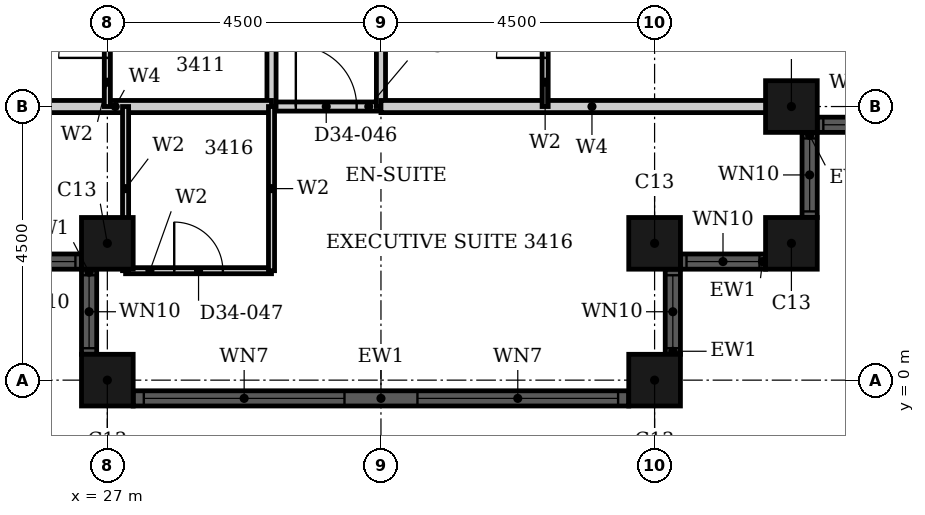
"""IFC4 building model, lengths in metres.
Left out: names, types, materials, properties, quantities, classifications, styles, units other than length and angle.
Written with IfcOpenShell. Run it as: python <this file> out.ifc"""

import sys

from ifc_helpers import new_model, si_unit, direction, frame, frame_2d, origin, origin_2d, place, context, subcontext, project, spatial, rectangle, hollow_rectangle, extrude, element, fill, save


model = new_model("IFC4")
c1 = context("Model", 3, precision=1e-05, world=origin(), true_north=direction((0.0, 1.0)))
c2 = subcontext(c1, "Body", "Model", "MODEL_VIEW")
j1 = project(units=[si_unit("LENGTHUNIT", "METRE"), si_unit("PLANEANGLEUNIT", "RADIAN")], contexts=[c1])
p1 = place(None, origin())
s1 = spatial("IfcSite", under=j1, at=p1, CompositionType="ELEMENT")
p2 = place(p1, origin())
s2 = spatial("IfcBuilding", under=s1, at=p2, CompositionType="ELEMENT")
p3 = place(p2, frame((0.0, 0.0, 136.8)))
s3 = spatial("IfcBuildingStorey", under=s2, at=p3, CompositionType="ELEMENT", Elevation=136.8)
for number, where, z_axis, x_axis in (
    (1, (27.0, 2.25, 0.0), (0.0, 0.0, 1.0), (1.0, 0.0, 0.0)),
    (2, (27.0, 0.0, 0.0), (0.0, 0.0, 1.0), (1.0, 0.0, 0.0)),
    (3, (36.0, 0.0, 0.0), (0.0, 0.0, 1.0), (1.0, 0.0, 0.0)),
    (4, (36.0, 2.25, 0.0), (0.0, 0.0, 1.0), (1.0, 0.0, 0.0)),
    (5, (38.25, 2.25, 0.0), (0.0, 0.0, 1.0), (1.0, 0.0, 0.0)),
    (6, (38.25, 4.5, 0.0), (0.0, 0.0, 1.0), (1.0, 0.0, 0.0)),
):
    element("IfcColumn", number, at=place(p3, frame(where, z_axis=z_axis, x_axis=x_axis)), inside=s3, PredefinedType="COLUMN", context=c2, shape_type="SweptSolid", body=[
        extrude(hollow_rectangle(XDim=0.85, YDim=0.85, WallThickness=0.026, at=origin_2d()), origin(), (0.0, 0.0, 1.0), 3.6),
    ])
p4 = place(p3, frame((25.175, 1.95, 0.0), z_axis=(0.0, 0.0, 1.0), x_axis=(1.0, 0.0, 0.0)))
e7 = element("IfcWall", 7, at=p4, inside=s3, PredefinedType="SOLIDWALL", context=c2, shape_type="SweptSolid", body=[
    extrude(rectangle(XDim=1.4, YDim=0.25, at=frame_2d((0.7, 0.0))), origin(), (0.0, 0.0, 1.0), 3.6),
])
p5 = place(p4, frame((0.1, 0.0, 0.9)))
e8 = element("IfcOpeningElement", 8, at=p5, cuts=e7, PredefinedType="OPENING", context=c2, shape_type="SweptSolid", body=[
    extrude(rectangle(XDim=1.2, YDim=1.85, at=frame_2d((0.6, 0.925))), frame((0.0, 0.135, 0.0), z_axis=(0.0, -1.0, 0.0), x_axis=(1.0, 0.0, 0.0)), (0.0, 0.0, 1.0), 0.27),
])
p6 = place(p3, frame((26.7, 1.825, 0.0), z_axis=(0.0, 0.0, 1.0), x_axis=(0.0, -1.0, 0.0)))
e9 = element("IfcWall", 9, at=p6, inside=s3, PredefinedType="SOLIDWALL", context=c2, shape_type="SweptSolid", body=[
    extrude(rectangle(XDim=1.4, YDim=0.25, at=frame_2d((0.7, 0.0))), origin(), (0.0, 0.0, 1.0), 3.6),
])
p7 = place(p6, frame((0.1, 0.0, 0.9)))
e10 = element("IfcOpeningElement", 10, at=p7, cuts=e9, PredefinedType="OPENING", context=c2, shape_type="SweptSolid", body=[
    extrude(rectangle(XDim=1.2, YDim=1.85, at=frame_2d((0.6, 0.925))), frame((0.0, 0.135, 0.0), z_axis=(0.0, -1.0, 0.0), x_axis=(1.0, 0.0, 0.0)), (0.0, 0.0, 1.0), 0.27),
])
p8 = place(p3, frame((27.425, -0.3, 0.0), z_axis=(0.0, 0.0, 1.0), x_axis=(1.0, 0.0, 0.0)))
e11 = element("IfcWall", 11, at=p8, inside=s3, PredefinedType="SOLIDWALL", context=c2, shape_type="SweptSolid", body=[
    extrude(rectangle(XDim=8.15, YDim=0.25, at=frame_2d((4.075, 0.0))), origin(), (0.0, 0.0, 1.0), 3.6),
])
p9 = place(p8, frame((0.175, 0.0, 0.9)))
e12 = element("IfcOpeningElement", 12, at=p9, cuts=e11, PredefinedType="OPENING", context=c2, shape_type="SweptSolid", body=[
    extrude(rectangle(XDim=3.3, YDim=1.85, at=frame_2d((1.65, 0.925))), frame((0.0, 0.135, 0.0), z_axis=(0.0, -1.0, 0.0), x_axis=(1.0, 0.0, 0.0)), (0.0, 0.0, 1.0), 0.27),
])
p10 = place(p8, frame((4.675, 0.0, 0.9)))
e13 = element("IfcOpeningElement", 13, at=p10, cuts=e11, PredefinedType="OPENING", context=c2, shape_type="SweptSolid", body=[
    extrude(rectangle(XDim=3.3, YDim=1.85, at=frame_2d((1.65, 0.925))), frame((0.0, 0.135, 0.0), z_axis=(0.0, -1.0, 0.0), x_axis=(1.0, 0.0, 0.0)), (0.0, 0.0, 1.0), 0.27),
])
p11 = place(p3, frame((36.3, 0.425, 0.0), z_axis=(0.0, 0.0, 1.0), x_axis=(0.0, 1.0, 0.0)))
e14 = element("IfcWall", 14, at=p11, inside=s3, PredefinedType="SOLIDWALL", context=c2, shape_type="SweptSolid", body=[
    extrude(rectangle(XDim=1.4, YDim=0.25, at=frame_2d((0.7, 0.0))), origin(), (0.0, 0.0, 1.0), 3.6),
])
p12 = place(p11, frame((0.1, 0.0, 0.9)))
e15 = element("IfcOpeningElement", 15, at=p12, cuts=e14, PredefinedType="OPENING", context=c2, shape_type="SweptSolid", body=[
    extrude(rectangle(XDim=1.2, YDim=1.85, at=frame_2d((0.6, 0.925))), frame((0.0, 0.135, 0.0), z_axis=(0.0, -1.0, 0.0), x_axis=(1.0, 0.0, 0.0)), (0.0, 0.0, 1.0), 0.27),
])
p13 = place(p3, frame((36.425, 1.95, 0.0), z_axis=(0.0, 0.0, 1.0), x_axis=(1.0, 0.0, 0.0)))
e16 = element("IfcWall", 16, at=p13, inside=s3, PredefinedType="SOLIDWALL", context=c2, shape_type="SweptSolid", body=[
    extrude(rectangle(XDim=1.4, YDim=0.25, at=frame_2d((0.7, 0.0))), origin(), (0.0, 0.0, 1.0), 3.6),
])
p14 = place(p13, frame((0.1, 0.0, 0.9)))
e17 = element("IfcOpeningElement", 17, at=p14, cuts=e16, PredefinedType="OPENING", context=c2, shape_type="SweptSolid", body=[
    extrude(rectangle(XDim=1.2, YDim=1.85, at=frame_2d((0.6, 0.925))), frame((0.0, 0.135, 0.0), z_axis=(0.0, -1.0, 0.0), x_axis=(1.0, 0.0, 0.0)), (0.0, 0.0, 1.0), 0.27),
])
p15 = place(p3, frame((38.55, 2.675, 0.0), z_axis=(0.0, 0.0, 1.0), x_axis=(0.0, 1.0, 0.0)))
e18 = element("IfcWall", 18, at=p15, inside=s3, PredefinedType="SOLIDWALL", context=c2, shape_type="SweptSolid", body=[
    extrude(rectangle(XDim=1.4, YDim=0.25, at=frame_2d((0.7, 0.0))), origin(), (0.0, 0.0, 1.0), 3.6),
])
p16 = place(p15, frame((0.1, 0.0, 0.9)))
e19 = element("IfcOpeningElement", 19, at=p16, cuts=e18, PredefinedType="OPENING", context=c2, shape_type="SweptSolid", body=[
    extrude(rectangle(XDim=1.2, YDim=1.85, at=frame_2d((0.6, 0.925))), frame((0.0, 0.135, 0.0), z_axis=(0.0, -1.0, 0.0), x_axis=(1.0, 0.0, 0.0)), (0.0, 0.0, 1.0), 0.27),
])
p17 = place(p3, frame((38.675, 4.2, 0.0), z_axis=(0.0, 0.0, 1.0), x_axis=(1.0, 0.0, 0.0)))
e20 = element("IfcWall", 20, at=p17, inside=s3, PredefinedType="SOLIDWALL", context=c2, shape_type="SweptSolid", body=[
    extrude(rectangle(XDim=1.4, YDim=0.25, at=frame_2d((0.7, 0.0))), origin(), (0.0, 0.0, 1.0), 3.6),
])
p18 = place(p17, frame((0.1, 0.0, 0.9)))
e21 = element("IfcOpeningElement", 21, at=p18, cuts=e20, PredefinedType="OPENING", context=c2, shape_type="SweptSolid", body=[
    extrude(rectangle(XDim=1.2, YDim=1.85, at=frame_2d((0.6, 0.925))), frame((0.0, 0.135, 0.0), z_axis=(0.0, -1.0, 0.0), x_axis=(1.0, 0.0, 0.0)), (0.0, 0.0, 1.0), 0.27),
])
p19 = place(p3, frame((29.7, 4.5, 0.0), z_axis=(0.0, 0.0, 1.0), x_axis=(1.0, 0.0, 0.0)))
e22 = element("IfcWall", 22, at=p19, inside=s3, PredefinedType="PARTITIONING", context=c2, shape_type="SweptSolid", body=[
    extrude(rectangle(XDim=1.8, YDim=0.15, at=frame_2d((0.9, 0.0))), origin(), (0.0, 0.0, 1.0), 3.2),
])
p20 = place(p19, frame((0.4, 0.0, 0.0)))
e23 = element("IfcOpeningElement", 23, at=p20, cuts=e22, PredefinedType="OPENING", context=c2, shape_type="SweptSolid", body=[
    extrude(rectangle(XDim=1.0, YDim=2.1, at=frame_2d((0.5, 1.05))), frame((0.0, 0.085, 0.0), z_axis=(0.0, -1.0, 0.0), x_axis=(1.0, 0.0, 0.0)), (0.0, 0.0, 1.0), 0.17),
])
p21 = place(p3, frame((29.7, 4.5, 0.0), z_axis=(0.0, 0.0, 1.0), x_axis=(0.0, 1.0, 0.0)))
e24 = element("IfcWall", 24, at=p21, inside=s3, PredefinedType="PARTITIONING", context=c2, shape_type="SweptSolid", body=[
    extrude(rectangle(XDim=16.2, YDim=0.15, at=frame_2d((8.1, 0.0))), origin(), (0.0, 0.0, 1.0), 3.2),
])
p22 = place(p21, frame((7.45, 0.0, 0.0)))
e25 = element("IfcOpeningElement", 25, at=p22, cuts=e24, PredefinedType="OPENING", context=c2, shape_type="SweptSolid", body=[
    extrude(rectangle(XDim=1.0, YDim=2.1, at=frame_2d((0.5, 1.05))), frame((0.0, 0.085, 0.0), z_axis=(0.0, -1.0, 0.0), x_axis=(1.0, 0.0, 0.0)), (0.0, 0.0, 1.0), 0.17),
])
p23 = place(p21, frame((2.95, 0.0, 0.0)))
e26 = element("IfcOpeningElement", 26, at=p23, cuts=e24, PredefinedType="OPENING", context=c2, shape_type="SweptSolid", body=[
    extrude(rectangle(XDim=1.0, YDim=2.1, at=frame_2d((0.5, 1.05))), frame((0.0, 0.085, 0.0), z_axis=(0.0, -1.0, 0.0), x_axis=(1.0, 0.0, 0.0)), (0.0, 0.0, 1.0), 0.17),
])
p24 = place(p3, frame((31.5, 4.5, 0.0), z_axis=(0.0, 0.0, 1.0), x_axis=(0.0, 1.0, 0.0)))
e27 = element("IfcWall", 27, at=p24, inside=s3, PredefinedType="PARTITIONING", context=c2, shape_type="SweptSolid", body=[
    extrude(rectangle(XDim=16.2, YDim=0.15, at=frame_2d((8.1, 0.0))), origin(), (0.0, 0.0, 1.0), 2.48),
])
p25 = place(p24, frame((6.25, 0.0, 0.0)))
e28 = element("IfcOpeningElement", 28, at=p25, cuts=e27, PredefinedType="OPENING", context=c2, shape_type="SweptSolid", body=[
    extrude(rectangle(XDim=1.0, YDim=2.1, at=frame_2d((0.5, 1.05))), frame((0.0, 0.085, 0.0), z_axis=(0.0, -1.0, 0.0), x_axis=(1.0, 0.0, 0.0)), (0.0, 0.0, 1.0), 0.17),
])
p26 = place(p3, frame((24.56, 4.5, 0.0), z_axis=(0.0, 0.0, 1.0), x_axis=(1.0, 0.0, 0.0)))
e29 = element("IfcWall", 29, at=p26, inside=s3, PredefinedType="PARTITIONING", context=c2, shape_type="SweptSolid", body=[
    extrude(rectangle(XDim=5.14, YDim=0.2, at=frame_2d((2.57, 0.0))), origin(), (0.0, 0.0, 1.0), 3.2),
])
p27 = place(p3, frame((31.5, 4.5, 0.0), z_axis=(0.0, 0.0, 1.0), x_axis=(1.0, 0.0, 0.0)))
e30 = element("IfcWall", 30, at=p27, inside=s3, PredefinedType="PARTITIONING", context=c2, shape_type="SweptSolid", body=[
    extrude(rectangle(XDim=6.94, YDim=0.2, at=frame_2d((3.47, 0.0))), origin(), (0.0, 0.0, 1.0), 3.2),
])
p28 = place(p3, frame((27.3, 1.8, 0.0), z_axis=(0.0, 0.0, 1.0), x_axis=(1.0, 0.0, 0.0)))
e31 = element("IfcWall", 31, at=p28, inside=s3, PredefinedType="PARTITIONING", context=c2, shape_type="SweptSolid", body=[
    extrude(rectangle(XDim=2.4, YDim=0.1, at=frame_2d((1.2, 0.0))), origin(), (0.0, 0.0, 1.0), 3.2),
])
p29 = place(p28, frame((0.8, 0.0, 0.0)))
e32 = element("IfcOpeningElement", 32, at=p29, cuts=e31, PredefinedType="OPENING", context=c2, shape_type="SweptSolid", body=[
    extrude(rectangle(XDim=0.8, YDim=2.1, at=frame_2d((0.4, 1.05))), frame((0.0, 0.06, 0.0), z_axis=(0.0, -1.0, 0.0), x_axis=(1.0, 0.0, 0.0)), (0.0, 0.0, 1.0), 0.12),
])
p30 = place(p3, frame((27.0, 4.5, 0.0), z_axis=(0.0, 0.0, 1.0), x_axis=(0.0, 1.0, 0.0)))
e33 = element("IfcWall", 33, at=p30, inside=s3, PredefinedType="PARTITIONING", context=c2, shape_type="SweptSolid", body=[
    extrude(rectangle(XDim=2.4, YDim=0.1, at=frame_2d((1.2, 0.0))), origin(), (0.0, 0.0, 1.0), 2.48),
])
p31 = place(p30, frame((0.8, 0.0, 0.0)))
e34 = element("IfcOpeningElement", 34, at=p31, cuts=e33, PredefinedType="OPENING", context=c2, shape_type="SweptSolid", body=[
    extrude(rectangle(XDim=0.8, YDim=2.1, at=frame_2d((0.4, 1.05))), frame((0.0, 0.06, 0.0), z_axis=(0.0, -1.0, 0.0), x_axis=(1.0, 0.0, 0.0)), (0.0, 0.0, 1.0), 0.12),
])
for number, where, z_axis, x_axis in (
    (35, (27.3, 1.8, 0.0), (0.0, 0.0, 1.0), (0.0, 1.0, 0.0)),
    (36, (29.7, 1.8, 0.0), (0.0, 0.0, 1.0), (0.0, 1.0, 0.0)),
):
    element("IfcWall", number, at=place(p3, frame(where, z_axis=z_axis, x_axis=x_axis)), inside=s3, PredefinedType="PARTITIONING", context=c2, shape_type="SweptSolid", body=[
        extrude(rectangle(XDim=2.7, YDim=0.1, at=frame_2d((1.35, 0.0))), origin(), (0.0, 0.0, 1.0), 3.2),
    ])
p32 = place(p3, frame((34.2, 4.5, 0.0), z_axis=(0.0, 0.0, 1.0), x_axis=(0.0, 1.0, 0.0)))
e37 = element("IfcWall", 37, at=p32, inside=s3, PredefinedType="PARTITIONING", context=c2, shape_type="SweptSolid", body=[
    extrude(rectangle(XDim=2.4, YDim=0.1, at=frame_2d((1.2, 0.0))), origin(), (0.0, 0.0, 1.0), 3.2),
])
p33 = place(p32, frame((0.8, 0.0, 0.0)))
e38 = element("IfcOpeningElement", 38, at=p33, cuts=e37, PredefinedType="OPENING", context=c2, shape_type="SweptSolid", body=[
    extrude(rectangle(XDim=0.8, YDim=2.1, at=frame_2d((0.4, 1.05))), frame((0.0, 0.06, 0.0), z_axis=(0.0, -1.0, 0.0), x_axis=(1.0, 0.0, 0.0)), (0.0, 0.0, 1.0), 0.12),
])
p34 = place(p5, origin())
e39 = element("IfcWindow", 39, at=p34, inside=s3, PartitioningType="SINGLE_PANEL", PredefinedType="WINDOW", context=c2, shape_type="SweptSolid", body=[
    extrude(rectangle(XDim=1.2, YDim=1.85, at=frame_2d((0.6, 0.925))), frame((0.0, 0.03, 0.0), z_axis=(0.0, -1.0, 0.0), x_axis=(1.0, 0.0, 0.0)), (0.0, 0.0, 1.0), 0.06),
])
fill(e8, e39)
p35 = place(p7, origin())
e40 = element("IfcWindow", 40, at=p35, inside=s3, PartitioningType="SINGLE_PANEL", PredefinedType="WINDOW", context=c2, shape_type="SweptSolid", body=[
    extrude(rectangle(XDim=1.2, YDim=1.85, at=frame_2d((0.6, 0.925))), frame((0.0, 0.03, 0.0), z_axis=(0.0, -1.0, 0.0), x_axis=(1.0, 0.0, 0.0)), (0.0, 0.0, 1.0), 0.06),
])
fill(e10, e40)
p36 = place(p9, origin())
e41 = element("IfcWindow", 41, at=p36, inside=s3, PartitioningType="SINGLE_PANEL", PredefinedType="WINDOW", context=c2, shape_type="SweptSolid", body=[
    extrude(rectangle(XDim=3.3, YDim=1.85, at=frame_2d((1.65, 0.925))), frame((0.0, 0.03, 0.0), z_axis=(0.0, -1.0, 0.0), x_axis=(1.0, 0.0, 0.0)), (0.0, 0.0, 1.0), 0.06),
])
fill(e12, e41)
p37 = place(p10, origin())
e42 = element("IfcWindow", 42, at=p37, inside=s3, PartitioningType="SINGLE_PANEL", PredefinedType="WINDOW", context=c2, shape_type="SweptSolid", body=[
    extrude(rectangle(XDim=3.3, YDim=1.85, at=frame_2d((1.65, 0.925))), frame((0.0, 0.03, 0.0), z_axis=(0.0, -1.0, 0.0), x_axis=(1.0, 0.0, 0.0)), (0.0, 0.0, 1.0), 0.06),
])
fill(e13, e42)
p38 = place(p12, origin())
e43 = element("IfcWindow", 43, at=p38, inside=s3, PartitioningType="SINGLE_PANEL", PredefinedType="WINDOW", context=c2, shape_type="SweptSolid", body=[
    extrude(rectangle(XDim=1.2, YDim=1.85, at=frame_2d((0.6, 0.925))), frame((0.0, 0.03, 0.0), z_axis=(0.0, -1.0, 0.0), x_axis=(1.0, 0.0, 0.0)), (0.0, 0.0, 1.0), 0.06),
])
fill(e15, e43)
p39 = place(p14, origin())
e44 = element("IfcWindow", 44, at=p39, inside=s3, PartitioningType="SINGLE_PANEL", PredefinedType="WINDOW", context=c2, shape_type="SweptSolid", body=[
    extrude(rectangle(XDim=1.2, YDim=1.85, at=frame_2d((0.6, 0.925))), frame((0.0, 0.03, 0.0), z_axis=(0.0, -1.0, 0.0), x_axis=(1.0, 0.0, 0.0)), (0.0, 0.0, 1.0), 0.06),
])
fill(e17, e44)
p40 = place(p16, origin())
e45 = element("IfcWindow", 45, at=p40, inside=s3, PartitioningType="SINGLE_PANEL", PredefinedType="WINDOW", context=c2, shape_type="SweptSolid", body=[
    extrude(rectangle(XDim=1.2, YDim=1.85, at=frame_2d((0.6, 0.925))), frame((0.0, 0.03, 0.0), z_axis=(0.0, -1.0, 0.0), x_axis=(1.0, 0.0, 0.0)), (0.0, 0.0, 1.0), 0.06),
])
fill(e19, e45)
p41 = place(p18, origin())
e46 = element("IfcWindow", 46, at=p41, inside=s3, PartitioningType="SINGLE_PANEL", PredefinedType="WINDOW", context=c2, shape_type="SweptSolid", body=[
    extrude(rectangle(XDim=1.2, YDim=1.85, at=frame_2d((0.6, 0.925))), frame((0.0, 0.03, 0.0), z_axis=(0.0, -1.0, 0.0), x_axis=(1.0, 0.0, 0.0)), (0.0, 0.0, 1.0), 0.06),
])
fill(e21, e46)
p42 = place(p31, origin())
e47 = element("IfcDoor", 47, at=p42, inside=s3, OperationType="SINGLE_SWING_LEFT", PredefinedType="DOOR", context=c2, shape_type="SweptSolid", body=[
    extrude(rectangle(XDim=0.8, YDim=2.1, at=frame_2d((0.4, 1.05))), frame((0.0, 0.025, 0.0), z_axis=(0.0, -1.0, 0.0), x_axis=(1.0, 0.0, 0.0)), (0.0, 0.0, 1.0), 0.05),
])
fill(e34, e47)
p43 = place(p33, origin())
e48 = element("IfcDoor", 48, at=p43, inside=s3, OperationType="SINGLE_SWING_LEFT", PredefinedType="DOOR", context=c2, shape_type="SweptSolid", body=[
    extrude(rectangle(XDim=0.8, YDim=2.1, at=frame_2d((0.4, 1.05))), frame((0.0, 0.025, 0.0), z_axis=(0.0, -1.0, 0.0), x_axis=(1.0, 0.0, 0.0)), (0.0, 0.0, 1.0), 0.05),
])
fill(e38, e48)
p44 = place(p20, origin())
e49 = element("IfcDoor", 49, at=p44, inside=s3, OperationType="SINGLE_SWING_RIGHT", PredefinedType="DOOR", context=c2, shape_type="SweptSolid", body=[
    extrude(rectangle(XDim=1.0, YDim=2.1, at=frame_2d((0.5, 1.05))), frame((0.0, 0.025, 0.0), z_axis=(0.0, -1.0, 0.0), x_axis=(1.0, 0.0, 0.0)), (0.0, 0.0, 1.0), 0.05),
])
fill(e23, e49)
p45 = place(p29, origin())
e50 = element("IfcDoor", 50, at=p45, inside=s3, OperationType="SINGLE_SWING_LEFT", PredefinedType="DOOR", context=c2, shape_type="SweptSolid", body=[
    extrude(rectangle(XDim=0.8, YDim=2.1, at=frame_2d((0.4, 1.05))), frame((0.0, 0.025, 0.0), z_axis=(0.0, -1.0, 0.0), x_axis=(1.0, 0.0, 0.0)), (0.0, 0.0, 1.0), 0.05),
])
fill(e32, e50)
save(model, sys.argv[1])
